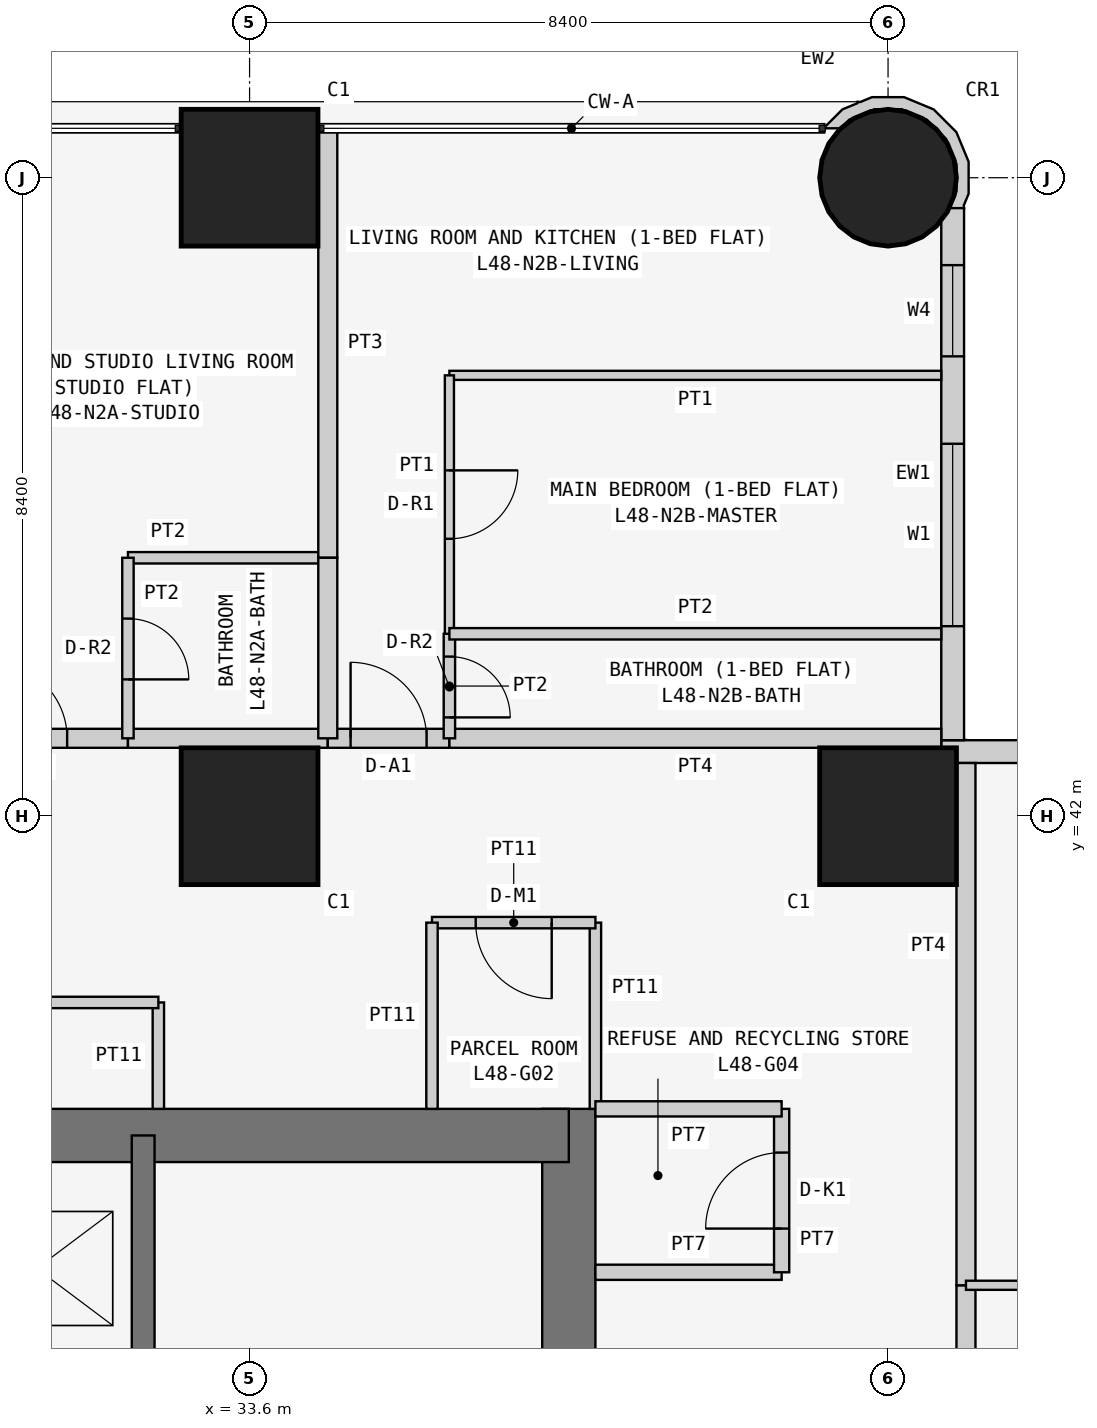
"""IFC4 building model, lengths in metres.
Left out: names, types, materials, properties, quantities, classifications, styles, units other than length and angle.
Written with IfcOpenShell. Run it as: python <this file> out.ifc"""

import sys

from ifc_helpers import new_model, si_unit, direction, frame, frame_2d, origin, origin_2d, place, context, subcontext, project, spatial, polyline, rectangle, circle, outline, extrude, element, fill, save


model = new_model("IFC4")
c1 = context("Model", 3, precision=1e-05, world=origin(), true_north=direction((0.0, 1.0)))
c2 = subcontext(c1, "Body", "Model", "MODEL_VIEW")
j1 = project(units=[si_unit("LENGTHUNIT", "METRE"), si_unit("PLANEANGLEUNIT", "RADIAN")], contexts=[c1])
p1 = place(None, origin())
s1 = spatial("IfcSite", under=j1, at=p1, CompositionType="ELEMENT")
p2 = place(p1, origin())
s2 = spatial("IfcBuilding", under=s1, at=p2, CompositionType="ELEMENT")
p3 = place(p2, frame((0.0, 0.0, 186.9)))
s3 = spatial("IfcBuildingStorey", under=s2, at=p3, CompositionType="ELEMENT", Elevation=186.9)
for number, where, z_axis, x_axis in (
    (1, (33.6, 42.0, 0.0), (0.0, 0.0, 1.0), (1.0, 0.0, 0.0)),
    (2, (33.6, 50.4, 0.0), (0.0, 0.0, 1.0), (1.0, 0.0, 0.0)),
    (3, (42.0, 42.0, 0.0), (0.0, 0.0, 1.0), (1.0, 0.0, 0.0)),
):
    element("IfcColumn", number, at=place(p3, frame(where, z_axis=z_axis, x_axis=x_axis)), inside=s3, PredefinedType="COLUMN", context=c2, shape_type="SweptSolid", body=[
        extrude(rectangle(XDim=1.8, YDim=1.8, at=origin_2d()), origin(), (0.0, 0.0, 1.0), 3.6),
    ])
p4 = place(p3, frame((42.0, 50.4, 0.0), z_axis=(0.0, 0.0, 1.0), x_axis=(1.0, 0.0, 0.0)))
e4 = element("IfcColumn", 4, at=p4, inside=s3, PredefinedType="COLUMN", context=c2, shape_type="SweptSolid", body=[
    extrude(circle(Radius=0.9, at=origin_2d()), origin(), (0.0, 0.0, 1.0), 3.6),
])
p5 = place(p3, frame((37.8, 21.0, 0.0), z_axis=(0.0, 0.0, 1.0), x_axis=(0.0, 1.0, 0.0)))
e5 = element("IfcWall", 5, at=p5, inside=s3, PredefinedType="SHEAR", context=c2, shape_type="SweptSolid", body=[
    extrude(rectangle(XDim=17.15, YDim=0.7, at=frame_2d((8.575, 0.0))), origin(), (0.0, 0.0, 1.0), 3.6),
])
p6 = place(p5, frame((5.2, 0.0, 0.0)))
e6 = element("IfcOpeningElement", 6, at=p6, cuts=e5, PredefinedType="OPENING", context=c2, shape_type="SweptSolid", body=[
    extrude(rectangle(XDim=1.2, YDim=2.1, at=frame_2d((0.6, 1.05))), frame((0.0, 0.36, 0.0), z_axis=(0.0, -1.0, 0.0), x_axis=(1.0, 0.0, 0.0)), (0.0, 0.0, 1.0), 0.72),
])
p7 = place(p3, frame((37.8, 37.8, 0.0), z_axis=(0.0, 0.0, 1.0), x_axis=(-1.0, 0.0, 0.0)))
e7 = element("IfcWall", 7, at=p7, inside=s3, PredefinedType="SHEAR", context=c2, shape_type="SweptSolid", body=[
    extrude(rectangle(XDim=17.15, YDim=0.7, at=frame_2d((8.575, 0.0))), origin(), (0.0, 0.0, 1.0), 3.6),
])
p8 = place(p3, frame((32.2, 29.25, 0.0), z_axis=(0.0, 0.0, 1.0), x_axis=(0.0, 1.0, 0.0)))
e8 = element("IfcWall", 8, at=p8, inside=s3, PredefinedType="SHEAR", context=c2, shape_type="SweptSolid", body=[
    extrude(rectangle(XDim=8.55, YDim=0.3, at=frame_2d((4.275, 0.0))), origin(), (0.0, 0.0, 1.0), 3.6),
])
p9 = place(p3, frame((50.0, 42.85, 0.0), z_axis=(0.0, 0.0, 1.0), x_axis=(-1.0, 0.0, 0.0)))
e9 = element("IfcWall", 9, at=p9, inside=s3, PredefinedType="SOLIDWALL", context=c2, shape_type="SweptSolid", body=[
    extrude(rectangle(XDim=7.3, YDim=0.3, at=frame_2d((3.65, 0.0))), origin(), (0.0, 0.0, 1.0), 3.45),
])
p10 = place(p9, frame((3.1, 0.0, 0.9)))
e10 = element("IfcOpeningElement", 10, at=p10, cuts=e9, PredefinedType="OPENING", context=c2, shape_type="SweptSolid", body=[
    extrude(rectangle(XDim=2.4, YDim=1.5, at=frame_2d((1.2, 0.75))), frame((0.0, 0.16, 0.0), z_axis=(0.0, -1.0, 0.0), x_axis=(1.0, 0.0, 0.0)), (0.0, 0.0, 1.0), 0.32),
])
p11 = place(p9, frame((0.75, 0.0, 0.9)))
e11 = element("IfcOpeningElement", 11, at=p11, cuts=e9, PredefinedType="OPENING", context=c2, shape_type="SweptSolid", body=[
    extrude(rectangle(XDim=1.2, YDim=1.5, at=frame_2d((0.6, 0.75))), frame((0.0, 0.16, 0.0), z_axis=(0.0, -1.0, 0.0), x_axis=(1.0, 0.0, 0.0)), (0.0, 0.0, 1.0), 0.32),
])
p12 = place(p3, frame((42.85, 43.0, 0.0), z_axis=(0.0, 0.0, 1.0), x_axis=(0.0, 1.0, 0.0)))
e12 = element("IfcWall", 12, at=p12, inside=s3, PredefinedType="SOLIDWALL", context=c2, shape_type="SweptSolid", body=[
    extrude(rectangle(XDim=7.0, YDim=0.3, at=frame_2d((3.5, 0.0))), origin(), (0.0, 0.0, 1.0), 3.45),
])
p13 = place(p12, frame((1.5, 0.0, 0.9)))
e13 = element("IfcOpeningElement", 13, at=p13, cuts=e12, PredefinedType="OPENING", context=c2, shape_type="SweptSolid", body=[
    extrude(rectangle(XDim=2.4, YDim=1.5, at=frame_2d((1.2, 0.75))), frame((0.0, 0.16, 0.0), z_axis=(0.0, -1.0, 0.0), x_axis=(1.0, 0.0, 0.0)), (0.0, 0.0, 1.0), 0.32),
])
p14 = place(p12, frame((5.05, 0.0, 0.9)))
e14 = element("IfcOpeningElement", 14, at=p14, cuts=e12, PredefinedType="OPENING", context=c2, shape_type="SweptSolid", body=[
    extrude(rectangle(XDim=1.2, YDim=1.5, at=frame_2d((0.6, 0.75))), frame((0.0, 0.16, 0.0), z_axis=(0.0, -1.0, 0.0), x_axis=(1.0, 0.0, 0.0)), (0.0, 0.0, 1.0), 0.32),
])
p15 = place(p3, frame((42.91, 50.036, 0.0), z_axis=(0.0, 0.0, 1.0), x_axis=(0.377204953059, 0.926129809145, 0.0)))
e15 = element("IfcWall", 15, at=p15, inside=s3, PredefinedType="SOLIDWALL", context=c2, shape_type="SweptSolid", body=[
    extrude(outline(polyline([(0.769, 1.728), (0.75, 1.723), (0.6, 1.875), (0.295, 2.004), (0.281, 1.998), (0.36, 1.803), (0.509, 1.741), (0.761, 1.486), (0.896, 1.154), (0.894, 0.795), (0.755, 0.465), (0.5, 0.213), (0.168, 0.078), (-0.1, 0.079), (0.001, -0.097), (0.03, -0.08), (0.198, -0.081), (0.589, 0.078), (0.889, 0.374), (1.053, 0.763), (1.055, 1.185), (0.896, 1.575), (0.778, 1.695), (0.769, 1.728)])), origin(), (0.0, 0.0, 1.0), 3.45),
])
p16 = place(p3, frame((32.4, 38.15, 0.0), z_axis=(0.0, 0.0, 1.0), x_axis=(0.0, 1.0, 0.0)))
e16 = element("IfcWall", 16, at=p16, inside=s3, PredefinedType="PARTITIONING", context=c2, shape_type="SweptSolid", body=[
    extrude(rectangle(XDim=1.4, YDim=0.15, at=frame_2d((0.7, 0.0))), origin(), (0.0, 0.0, 1.0), 3.45),
])
p17 = place(p3, frame((32.4, 39.55, 0.0), z_axis=(0.0, 0.0, 1.0), x_axis=(-1.0, 0.0, 0.0)))
e17 = element("IfcWall", 17, at=p17, inside=s3, PredefinedType="PARTITIONING", context=c2, shape_type="SweptSolid", body=[
    extrude(rectangle(XDim=11.75, YDim=0.15, at=frame_2d((5.875, 0.0))), origin(), (0.0, 0.0, 1.0), 3.45),
])
p18 = place(p17, frame((2.5, 0.0, 0.0)))
e18 = element("IfcOpeningElement", 18, at=p18, cuts=e17, PredefinedType="OPENING", context=c2, shape_type="SweptSolid", body=[
    extrude(rectangle(XDim=1.0, YDim=2.1, at=frame_2d((0.5, 1.05))), frame((0.0, 0.085, 0.0), z_axis=(0.0, -1.0, 0.0), x_axis=(1.0, 0.0, 0.0)), (0.0, 0.0, 1.0), 0.17),
])
p19 = place(p3, frame((38.15, 38.15, 0.0), z_axis=(0.0, 0.0, 1.0), x_axis=(0.0, 1.0, 0.0)))
e19 = element("IfcWall", 19, at=p19, inside=s3, PredefinedType="PARTITIONING", context=c2, shape_type="SweptSolid", body=[
    extrude(rectangle(XDim=2.45, YDim=0.15, at=frame_2d((1.225, 0.0))), origin(), (0.0, 0.0, 1.0), 3.45),
])
p20 = place(p3, frame((38.15, 40.6, 0.0), z_axis=(0.0, 0.0, 1.0), x_axis=(-1.0, 0.0, 0.0)))
e20 = element("IfcWall", 20, at=p20, inside=s3, PredefinedType="PARTITIONING", context=c2, shape_type="SweptSolid", body=[
    extrude(rectangle(XDim=2.15, YDim=0.15, at=frame_2d((1.075, 0.0))), origin(), (0.0, 0.0, 1.0), 3.45),
])
p21 = place(p20, frame((0.575, 0.0, 0.0)))
e21 = element("IfcOpeningElement", 21, at=p21, cuts=e20, PredefinedType="OPENING", context=c2, shape_type="SweptSolid", body=[
    extrude(rectangle(XDim=1.0, YDim=2.1, at=frame_2d((0.5, 1.05))), frame((0.0, 0.085, 0.0), z_axis=(0.0, -1.0, 0.0), x_axis=(1.0, 0.0, 0.0)), (0.0, 0.0, 1.0), 0.17),
])
p22 = place(p3, frame((36.0, 40.6, 0.0), z_axis=(0.0, 0.0, 1.0), x_axis=(0.0, -1.0, 0.0)))
e22 = element("IfcWall", 22, at=p22, inside=s3, PredefinedType="PARTITIONING", context=c2, shape_type="SweptSolid", body=[
    extrude(rectangle(XDim=2.45, YDim=0.15, at=frame_2d((1.225, 0.0))), origin(), (0.0, 0.0, 1.0), 3.45),
])
p23 = place(p3, frame((38.15, 36.0, 0.0), z_axis=(0.0, 0.0, 1.0), x_axis=(1.0, 0.0, 0.0)))
e23 = element("IfcWall", 23, at=p23, inside=s3, PredefinedType="PARTITIONING", context=c2, shape_type="SweptSolid", body=[
    extrude(rectangle(XDim=2.45, YDim=0.2, at=frame_2d((1.225, 0.0))), origin(), (0.0, 0.0, 1.0), 3.45),
])
p24 = place(p3, frame((40.6, 36.0, 0.0), z_axis=(0.0, 0.0, 1.0), x_axis=(0.0, 1.0, 0.0)))
e24 = element("IfcWall", 24, at=p24, inside=s3, PredefinedType="PARTITIONING", context=c2, shape_type="SweptSolid", body=[
    extrude(rectangle(XDim=2.15, YDim=0.2, at=frame_2d((1.075, 0.0))), origin(), (0.0, 0.0, 1.0), 3.45),
])
p25 = place(p24, frame((0.575, 0.0, 0.0)))
e25 = element("IfcOpeningElement", 25, at=p25, cuts=e24, PredefinedType="OPENING", context=c2, shape_type="SweptSolid", body=[
    extrude(rectangle(XDim=1.0, YDim=2.1, at=frame_2d((0.5, 1.05))), frame((0.0, 0.11, 0.0), z_axis=(0.0, -1.0, 0.0), x_axis=(1.0, 0.0, 0.0)), (0.0, 0.0, 1.0), 0.22),
])
p26 = place(p3, frame((40.6, 38.15, 0.0), z_axis=(0.0, 0.0, 1.0), x_axis=(-1.0, 0.0, 0.0)))
e26 = element("IfcWall", 26, at=p26, inside=s3, PredefinedType="PARTITIONING", context=c2, shape_type="SweptSolid", body=[
    extrude(rectangle(XDim=2.45, YDim=0.2, at=frame_2d((1.225, 0.0))), origin(), (0.0, 0.0, 1.0), 3.45),
])
p27 = place(p3, frame((29.4, 43.025, 0.0), z_axis=(0.0, 0.0, 1.0), x_axis=(1.0, 0.0, 0.0)))
e27 = element("IfcWall", 27, at=p27, inside=s3, PredefinedType="PARTITIONING", context=c2, shape_type="SweptSolid", body=[
    extrude(rectangle(XDim=2.6, YDim=0.25, at=frame_2d((1.3, 0.0))), origin(), (0.0, 0.0, 1.0), 3.45),
])
p28 = place(p27, frame((0.8, 0.0, 0.0)))
e28 = element("IfcOpeningElement", 28, at=p28, cuts=e27, PredefinedType="OPENING", context=c2, shape_type="SweptSolid", body=[
    extrude(rectangle(XDim=1.0, YDim=2.1, at=frame_2d((0.5, 1.05))), frame((0.0, 0.135, 0.0), z_axis=(0.0, -1.0, 0.0), x_axis=(1.0, 0.0, 0.0)), (0.0, 0.0, 1.0), 0.27),
])
p29 = place(p3, frame((32.0, 43.025, 0.0), z_axis=(0.0, 0.0, 1.0), x_axis=(1.0, 0.0, 0.0)))
e29 = element("IfcWall", 29, at=p29, inside=s3, PredefinedType="PARTITIONING", context=c2, shape_type="SweptSolid", body=[
    extrude(rectangle(XDim=2.629, YDim=0.25, at=frame_2d((1.314, 0.0))), origin(), (0.0, 0.0, 1.0), 3.45),
])
p30 = place(p3, frame((34.629, 43.025, 0.0), z_axis=(0.0, 0.0, 1.0), x_axis=(1.0, 0.0, 0.0)))
e30 = element("IfcWall", 30, at=p30, inside=s3, PredefinedType="PARTITIONING", context=c2, shape_type="SweptSolid", body=[
    extrude(rectangle(XDim=1.6, YDim=0.25, at=frame_2d((0.8, 0.0))), origin(), (0.0, 0.0, 1.0), 3.45),
])
p31 = place(p30, frame((0.3, 0.0, 0.0)))
e31 = element("IfcOpeningElement", 31, at=p31, cuts=e30, PredefinedType="OPENING", context=c2, shape_type="SweptSolid", body=[
    extrude(rectangle(XDim=1.0, YDim=2.1, at=frame_2d((0.5, 1.05))), frame((0.0, 0.135, 0.0), z_axis=(0.0, -1.0, 0.0), x_axis=(1.0, 0.0, 0.0)), (0.0, 0.0, 1.0), 0.27),
])
p32 = place(p3, frame((36.229, 43.025, 0.0), z_axis=(0.0, 0.0, 1.0), x_axis=(1.0, 0.0, 0.0)))
e32 = element("IfcWall", 32, at=p32, inside=s3, PredefinedType="PARTITIONING", context=c2, shape_type="SweptSolid", body=[
    extrude(rectangle(XDim=6.471, YDim=0.25, at=frame_2d((3.235, 0.0))), origin(), (0.0, 0.0, 1.0), 3.45),
])
p33 = place(p3, frame((43.025, 35.829, 0.0), z_axis=(0.0, 0.0, 1.0), x_axis=(0.0, -1.0, 0.0)))
e33 = element("IfcWall", 33, at=p33, inside=s3, PredefinedType="PARTITIONING", context=c2, shape_type="SweptSolid", body=[
    extrude(rectangle(XDim=1.2, YDim=0.25, at=frame_2d((0.6, 0.0))), origin(), (0.0, 0.0, 1.0), 3.45),
])
p34 = place(p3, frame((43.025, 42.7, 0.0), z_axis=(0.0, 0.0, 1.0), x_axis=(0.0, -1.0, 0.0)))
e34 = element("IfcWall", 34, at=p34, inside=s3, PredefinedType="PARTITIONING", context=c2, shape_type="SweptSolid", body=[
    extrude(rectangle(XDim=6.871, YDim=0.25, at=frame_2d((3.436, 0.0))), origin(), (0.0, 0.0, 1.0), 3.45),
])
p35 = place(p3, frame((34.629, 45.4, 0.0), z_axis=(0.0, 0.0, 1.0), x_axis=(-1.0, 0.0, 0.0)))
e35 = element("IfcWall", 35, at=p35, inside=s3, PredefinedType="PARTITIONING", context=c2, shape_type="SweptSolid", body=[
    extrude(rectangle(XDim=2.629, YDim=0.15, at=frame_2d((1.314, 0.0))), origin(), (0.0, 0.0, 1.0), 3.45),
])
p36 = place(p3, frame((32.0, 45.4, 0.0), z_axis=(0.0, 0.0, 1.0), x_axis=(0.0, -1.0, 0.0)))
e36 = element("IfcWall", 36, at=p36, inside=s3, PredefinedType="PARTITIONING", context=c2, shape_type="SweptSolid", body=[
    extrude(rectangle(XDim=2.375, YDim=0.15, at=frame_2d((1.188, 0.0))), origin(), (0.0, 0.0, 1.0), 3.45),
])
p37 = place(p36, frame((0.8, 0.0, 0.0)))
e37 = element("IfcOpeningElement", 37, at=p37, cuts=e36, PredefinedType="OPENING", context=c2, shape_type="SweptSolid", body=[
    extrude(rectangle(XDim=0.8, YDim=2.1, at=frame_2d((0.4, 1.05))), frame((0.0, 0.085, 0.0), z_axis=(0.0, -1.0, 0.0), x_axis=(1.0, 0.0, 0.0)), (0.0, 0.0, 1.0), 0.17),
])
p38 = place(p3, frame((34.629, 51.05, 0.0), z_axis=(0.0, 0.0, 1.0), x_axis=(0.0, -1.0, 0.0)))
e38 = element("IfcWall", 38, at=p38, inside=s3, PredefinedType="PARTITIONING", context=c2, shape_type="SweptSolid", body=[
    extrude(rectangle(XDim=5.65, YDim=0.25, at=frame_2d((2.825, 0.0))), origin(), (0.0, 0.0, 1.0), 3.45),
])
p39 = place(p3, frame((34.629, 45.4, 0.0), z_axis=(0.0, 0.0, 1.0), x_axis=(0.0, -1.0, 0.0)))
e39 = element("IfcWall", 39, at=p39, inside=s3, PredefinedType="PARTITIONING", context=c2, shape_type="SweptSolid", body=[
    extrude(rectangle(XDim=2.375, YDim=0.25, at=frame_2d((1.188, 0.0))), origin(), (0.0, 0.0, 1.0), 3.45),
])
p40 = place(p3, frame((36.229, 44.4, 0.0), z_axis=(0.0, 0.0, 1.0), x_axis=(0.0, -1.0, 0.0)))
e40 = element("IfcWall", 40, at=p40, inside=s3, PredefinedType="PARTITIONING", context=c2, shape_type="SweptSolid", body=[
    extrude(rectangle(XDim=1.375, YDim=0.15, at=frame_2d((0.688, 0.0))), origin(), (0.0, 0.0, 1.0), 3.45),
])
p41 = place(p40, frame((0.3, 0.0, 0.0)))
e41 = element("IfcOpeningElement", 41, at=p41, cuts=e40, PredefinedType="OPENING", context=c2, shape_type="SweptSolid", body=[
    extrude(rectangle(XDim=0.8, YDim=2.1, at=frame_2d((0.4, 1.05))), frame((0.0, 0.085, 0.0), z_axis=(0.0, -1.0, 0.0), x_axis=(1.0, 0.0, 0.0)), (0.0, 0.0, 1.0), 0.17),
])
p42 = place(p3, frame((42.7, 47.8, 0.0), z_axis=(0.0, 0.0, 1.0), x_axis=(-1.0, 0.0, 0.0)))
e42 = element("IfcWall", 42, at=p42, inside=s3, PredefinedType="PARTITIONING", context=c2, shape_type="SweptSolid", body=[
    extrude(rectangle(XDim=6.471, YDim=0.12, at=frame_2d((3.235, 0.0))), origin(), (0.0, 0.0, 1.0), 3.45),
])
p43 = place(p3, frame((36.229, 47.8, 0.0), z_axis=(0.0, 0.0, 1.0), x_axis=(0.0, -1.0, 0.0)))
e43 = element("IfcWall", 43, at=p43, inside=s3, PredefinedType="PARTITIONING", context=c2, shape_type="SweptSolid", body=[
    extrude(rectangle(XDim=3.4, YDim=0.12, at=frame_2d((1.7, 0.0))), origin(), (0.0, 0.0, 1.0), 3.45),
])
p44 = place(p43, frame((1.25, 0.0, 0.0)))
e44 = element("IfcOpeningElement", 44, at=p44, cuts=e43, PredefinedType="OPENING", context=c2, shape_type="SweptSolid", body=[
    extrude(rectangle(XDim=0.9, YDim=2.1, at=frame_2d((0.45, 1.05))), frame((0.0, 0.07, 0.0), z_axis=(0.0, -1.0, 0.0), x_axis=(1.0, 0.0, 0.0)), (0.0, 0.0, 1.0), 0.14),
])
p45 = place(p3, frame((36.229, 44.4, 0.0), z_axis=(0.0, 0.0, 1.0), x_axis=(1.0, 0.0, 0.0)))
e45 = element("IfcWall", 45, at=p45, inside=s3, PredefinedType="PARTITIONING", context=c2, shape_type="SweptSolid", body=[
    extrude(rectangle(XDim=6.471, YDim=0.15, at=frame_2d((3.235, 0.0))), origin(), (0.0, 0.0, 1.0), 3.45),
])
p46 = place(p3, frame((43.025, 35.829, 0.0), z_axis=(0.0, 0.0, 1.0), x_axis=(1.0, 0.0, 0.0)))
e46 = element("IfcWall", 46, at=p46, inside=s3, PredefinedType="PARTITIONING", context=c2, shape_type="SweptSolid", body=[
    extrude(rectangle(XDim=4.775, YDim=0.12, at=frame_2d((2.388, 0.0))), origin(), (0.0, 0.0, 1.0), 3.45),
])
p47 = place(p46, frame((1.925, 0.0, 0.0)))
e47 = element("IfcOpeningElement", 47, at=p47, cuts=e46, PredefinedType="OPENING", context=c2, shape_type="SweptSolid", body=[
    extrude(rectangle(XDim=0.9, YDim=2.1, at=frame_2d((0.45, 1.05))), frame((0.0, 0.07, 0.0), z_axis=(0.0, -1.0, 0.0), x_axis=(1.0, 0.0, 0.0)), (0.0, 0.0, 1.0), 0.14),
])
p48 = place(p13, origin())
e48 = element("IfcWindow", 48, at=p48, inside=s3, PartitioningType="SINGLE_PANEL", PredefinedType="WINDOW", context=c2, shape_type="SweptSolid", body=[
    extrude(rectangle(XDim=2.4, YDim=1.5, at=frame_2d((1.2, 0.75))), frame((0.0, 0.03, 0.0), z_axis=(0.0, -1.0, 0.0), x_axis=(1.0, 0.0, 0.0)), (0.0, 0.0, 1.0), 0.06),
])
fill(e13, e48)
p49 = place(p14, origin())
e49 = element("IfcWindow", 49, at=p49, inside=s3, PartitioningType="SINGLE_PANEL", PredefinedType="WINDOW", context=c2, shape_type="SweptSolid", body=[
    extrude(rectangle(XDim=1.2, YDim=1.5, at=frame_2d((0.6, 0.75))), frame((0.0, 0.03, 0.0), z_axis=(0.0, -1.0, 0.0), x_axis=(1.0, 0.0, 0.0)), (0.0, 0.0, 1.0), 0.06),
])
fill(e14, e49)
p50 = place(p21, origin())
e50 = element("IfcDoor", 50, at=p50, inside=s3, OperationType="SINGLE_SWING_LEFT", PredefinedType="DOOR", context=c2, shape_type="SweptSolid", body=[
    extrude(rectangle(XDim=1.0, YDim=2.1, at=frame_2d((0.5, 1.05))), frame((0.0, 0.025, 0.0), z_axis=(0.0, -1.0, 0.0), x_axis=(1.0, 0.0, 0.0)), (0.0, 0.0, 1.0), 0.05),
])
fill(e21, e50)
p51 = place(p25, origin())
e51 = element("IfcDoor", 51, at=p51, inside=s3, OperationType="SINGLE_SWING_LEFT", PredefinedType="DOOR", context=c2, shape_type="SweptSolid", body=[
    extrude(rectangle(XDim=1.0, YDim=2.1, at=frame_2d((0.5, 1.05))), frame((0.0, 0.025, 0.0), z_axis=(0.0, -1.0, 0.0), x_axis=(1.0, 0.0, 0.0)), (0.0, 0.0, 1.0), 0.05),
])
fill(e25, e51)
p52 = place(p28, origin())
e52 = element("IfcDoor", 52, at=p52, inside=s3, OperationType="SINGLE_SWING_LEFT", PredefinedType="DOOR", context=c2, shape_type="SweptSolid", body=[
    extrude(rectangle(XDim=1.0, YDim=2.1, at=frame_2d((0.5, 1.05))), frame((0.0, 0.025, 0.0), z_axis=(0.0, -1.0, 0.0), x_axis=(1.0, 0.0, 0.0)), (0.0, 0.0, 1.0), 0.05),
])
fill(e28, e52)
p53 = place(p37, origin())
e53 = element("IfcDoor", 53, at=p53, inside=s3, OperationType="SINGLE_SWING_RIGHT", PredefinedType="DOOR", context=c2, shape_type="SweptSolid", body=[
    extrude(rectangle(XDim=0.8, YDim=2.1, at=frame_2d((0.4, 1.05))), frame((0.0, 0.025, 0.0), z_axis=(0.0, -1.0, 0.0), x_axis=(1.0, 0.0, 0.0)), (0.0, 0.0, 1.0), 0.05),
])
fill(e37, e53)
p54 = place(p31, origin())
e54 = element("IfcDoor", 54, at=p54, inside=s3, OperationType="SINGLE_SWING_LEFT", PredefinedType="DOOR", context=c2, shape_type="SweptSolid", body=[
    extrude(rectangle(XDim=1.0, YDim=2.1, at=frame_2d((0.5, 1.05))), frame((0.0, 0.025, 0.0), z_axis=(0.0, -1.0, 0.0), x_axis=(1.0, 0.0, 0.0)), (0.0, 0.0, 1.0), 0.05),
])
fill(e31, e54)
p55 = place(p41, origin())
e55 = element("IfcDoor", 55, at=p55, inside=s3, OperationType="SINGLE_SWING_RIGHT", PredefinedType="DOOR", context=c2, shape_type="SweptSolid", body=[
    extrude(rectangle(XDim=0.8, YDim=2.1, at=frame_2d((0.4, 1.05))), frame((0.0, 0.025, 0.0), z_axis=(0.0, -1.0, 0.0), x_axis=(1.0, 0.0, 0.0)), (0.0, 0.0, 1.0), 0.05),
])
fill(e41, e55)
p56 = place(p44, origin())
e56 = element("IfcDoor", 56, at=p56, inside=s3, OperationType="SINGLE_SWING_LEFT", PredefinedType="DOOR", context=c2, shape_type="SweptSolid", body=[
    extrude(rectangle(XDim=0.9, YDim=2.1, at=frame_2d((0.45, 1.05))), frame((0.0, 0.025, 0.0), z_axis=(0.0, -1.0, 0.0), x_axis=(1.0, 0.0, 0.0)), (0.0, 0.0, 1.0), 0.05),
])
fill(e44, e56)
save(model, sys.argv[1])
